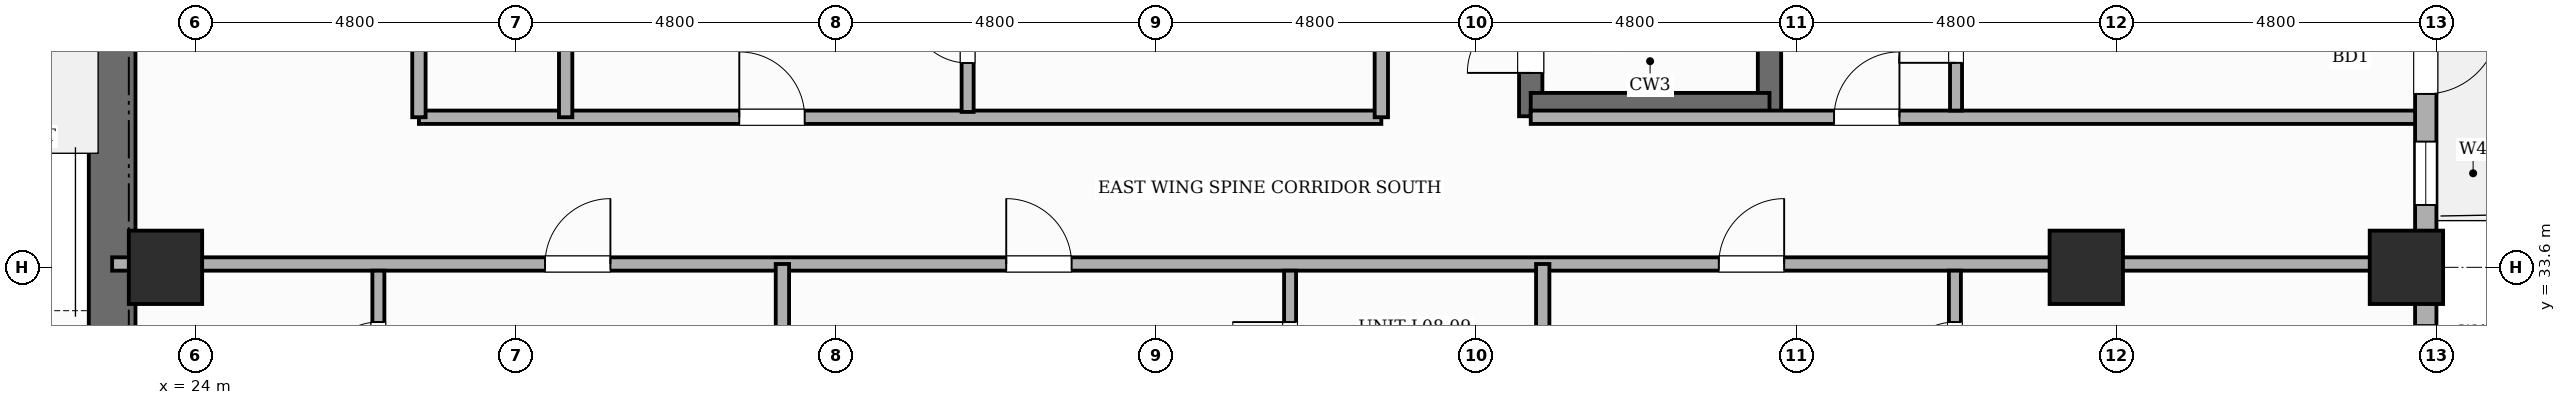
"""IFC4 building model, lengths in metres.
Left out: names, types, materials, properties, quantities, classifications, styles, units other than length and angle.
Written with IfcOpenShell. Run it as: python <this file> out.ifc"""

import sys

from ifc_helpers import new_model, si_unit, direction, frame, frame_2d, origin, origin_2d, place, context, subcontext, project, spatial, rectangle, extrude, element, fill, save


model = new_model("IFC4")
c1 = context("Model", 3, precision=1e-05, world=origin(), true_north=direction((0.0, 1.0)))
c2 = subcontext(c1, "Body", "Model", "MODEL_VIEW")
j1 = project(units=[si_unit("LENGTHUNIT", "METRE"), si_unit("PLANEANGLEUNIT", "RADIAN")], contexts=[c1])
p1 = place(None, origin())
s1 = spatial("IfcSite", under=j1, at=p1, CompositionType="ELEMENT")
p2 = place(p1, origin())
s2 = spatial("IfcBuilding", under=s1, at=p2, CompositionType="ELEMENT")
p3 = place(p2, frame((0.0, 0.0, 35.8)))
s3 = spatial("IfcBuildingStorey", under=s2, at=p3, CompositionType="ELEMENT", Elevation=35.8)
p4 = place(p3, frame((22.75, 30.55, 0.0), z_axis=(0.0, 0.0, 1.0), x_axis=(0.0, 1.0, 0.0)))
e1 = element("IfcWall", 1, at=p4, inside=s3, PredefinedType="SHEAR", context=c2, shape_type="SweptSolid", body=[
    extrude(rectangle(XDim=15.6, YDim=0.7, at=frame_2d((7.8, 0.0))), origin(), (0.0, 0.0, 1.0), 3.6),
])
p5 = place(p4, frame((10.8, 0.0, 0.0)))
e2 = element("IfcOpeningElement", 2, at=p5, cuts=e1, PredefinedType="OPENING", context=c2, shape_type="SweptSolid", body=[
    extrude(rectangle(XDim=1.0, YDim=2.15, at=frame_2d((0.5, 1.075))), frame((0.0, 0.36, 0.0), z_axis=(0.0, -1.0, 0.0), x_axis=(1.0, 0.0, 0.0)), (0.0, 0.0, 1.0), 0.72),
])
p6 = place(p3, frame((44.02, 35.865, 0.0), z_axis=(0.0, 0.0, 1.0), x_axis=(0.0, 1.0, 0.0)))
e3 = element("IfcWall", 3, at=p6, inside=s3, PredefinedType="SHEAR", context=c2, shape_type="SweptSolid", body=[
    extrude(rectangle(XDim=8.97, YDim=0.35, at=frame_2d((4.485, 0.0))), origin(), (0.0, 0.0, 1.0), 3.6),
])
p7 = place(p6, frame((0.65, 0.0, 0.0)))
e4 = element("IfcOpeningElement", 4, at=p7, cuts=e3, PredefinedType="OPENING", context=c2, shape_type="SweptSolid", body=[
    extrude(rectangle(XDim=0.95, YDim=2.1, at=frame_2d((0.475, 1.05))), frame((0.0, 0.185, 0.0), z_axis=(0.0, -1.0, 0.0), x_axis=(1.0, 0.0, 0.0)), (0.0, 0.0, 1.0), 0.37),
])
p8 = place(p3, frame((47.6, 35.865, 0.0), z_axis=(0.0, 0.0, 1.0), x_axis=(0.0, 1.0, 0.0)))
e5 = element("IfcWall", 5, at=p8, inside=s3, PredefinedType="SHEAR", context=c2, shape_type="SweptSolid", body=[
    extrude(rectangle(XDim=8.97, YDim=0.35, at=frame_2d((4.485, 0.0))), origin(), (0.0, 0.0, 1.0), 3.6),
])
p9 = place(p3, frame((44.02, 36.04, 0.0), z_axis=(0.0, 0.0, 1.0), x_axis=(1.0, 0.0, 0.0)))
e6 = element("IfcWall", 6, at=p9, inside=s3, PredefinedType="SHEAR", context=c2, shape_type="SweptSolid", body=[
    extrude(rectangle(XDim=3.58, YDim=0.35, at=frame_2d((1.79, 0.0))), origin(), (0.0, 0.0, 1.0), 3.6),
])
for number, where, z_axis, x_axis in (
    (7, (23.55, 33.6, 0.0), (0.0, 0.0, 1.0), (1.0, 0.0, 0.0)),
    (8, (52.35, 33.6, 0.0), (0.0, 0.0, 1.0), (1.0, 0.0, 0.0)),
    (9, (57.15, 33.6, 0.0), (0.0, 0.0, 1.0), (1.0, 0.0, 0.0)),
):
    element("IfcColumn", number, at=place(p3, frame(where, z_axis=z_axis, x_axis=x_axis)), inside=s3, PredefinedType="COLUMN", context=c2, shape_type="SweptSolid", body=[
        extrude(rectangle(XDim=1.1, YDim=1.1, at=origin_2d()), origin(), (0.0, 0.0, 1.0), 3.6),
    ])
p10 = place(p3, frame((57.44, 45.6, 0.0), z_axis=(0.0, 0.0, 1.0), x_axis=(0.0, -1.0, 0.0)))
e10 = element("IfcWall", 10, at=p10, inside=s3, PredefinedType="STANDARD", context=c2, shape_type="SweptSolid", body=[
    extrude(rectangle(XDim=14.4, YDim=0.32, at=frame_2d((7.2, 0.0))), origin(), (0.0, 0.0, 1.0), 2.53),
])
p11 = place(p10, frame((8.3, 0.0, 0.0)))
e11 = element("IfcOpeningElement", 11, at=p11, cuts=e10, PredefinedType="OPENING", context=c2, shape_type="SweptSolid", body=[
    extrude(rectangle(XDim=1.1, YDim=2.15, at=frame_2d((0.55, 1.075))), frame((0.0, 0.17, 0.0), z_axis=(0.0, -1.0, 0.0), x_axis=(1.0, 0.0, 0.0)), (0.0, 0.0, 1.0), 0.34),
])
p12 = place(p10, frame((0.47, 0.0, 0.45)))
e12 = element("IfcOpeningElement", 12, at=p12, cuts=e10, PredefinedType="OPENING", context=c2, shape_type="SweptSolid", body=[
    extrude(rectangle(XDim=0.95, YDim=1.8, at=frame_2d((0.475, 0.9))), frame((0.0, 0.17, 0.0), z_axis=(0.0, -1.0, 0.0), x_axis=(1.0, 0.0, 0.0)), (0.0, 0.0, 1.0), 0.34),
])
p13 = place(p10, frame((10.115, 0.0, 0.45)))
e13 = element("IfcOpeningElement", 13, at=p13, cuts=e10, PredefinedType="OPENING", context=c2, shape_type="SweptSolid", body=[
    extrude(rectangle(XDim=0.95, YDim=1.8, at=frame_2d((0.475, 0.9))), frame((0.0, 0.17, 0.0), z_axis=(0.0, -1.0, 0.0), x_axis=(1.0, 0.0, 0.0)), (0.0, 0.0, 1.0), 0.34),
])
p14 = place(p10, frame((12.867, 0.0, 0.45)))
e14 = element("IfcOpeningElement", 14, at=p14, cuts=e10, PredefinedType="OPENING", context=c2, shape_type="SweptSolid", body=[
    extrude(rectangle(XDim=0.95, YDim=1.8, at=frame_2d((0.475, 0.9))), frame((0.0, 0.17, 0.0), z_axis=(0.0, -1.0, 0.0), x_axis=(1.0, 0.0, 0.0)), (0.0, 0.0, 1.0), 0.34),
])
p15 = place(p10, frame((4.799, 0.0, 0.65)))
e15 = element("IfcOpeningElement", 15, at=p15, cuts=e10, PredefinedType="OPENING", context=c2, shape_type="SweptSolid", body=[
    extrude(rectangle(XDim=1.4, YDim=1.1, at=frame_2d((0.7, 0.55))), frame((0.0, 0.17, 0.0), z_axis=(0.0, -1.0, 0.0), x_axis=(1.0, 0.0, 0.0)), (0.0, 0.0, 1.0), 0.34),
])
p16 = place(p10, frame((3.194, 0.0, 0.45)))
e16 = element("IfcOpeningElement", 16, at=p16, cuts=e10, PredefinedType="OPENING", context=c2, shape_type="SweptSolid", body=[
    extrude(rectangle(XDim=0.95, YDim=1.8, at=frame_2d((0.475, 0.9))), frame((0.0, 0.17, 0.0), z_axis=(0.0, -1.0, 0.0), x_axis=(1.0, 0.0, 0.0)), (0.0, 0.0, 1.0), 0.34),
])
p17 = place(p3, frame((22.75, 33.65, 0.0), z_axis=(0.0, 0.0, 1.0), x_axis=(1.0, 0.0, 0.0)))
e17 = element("IfcWall", 17, at=p17, inside=s3, PredefinedType="PARTITIONING", context=c2, shape_type="SweptSolid", body=[
    extrude(rectangle(XDim=34.53, YDim=0.2, at=frame_2d((17.265, 0.0))), origin(), (0.0, 0.0, 1.0), 2.53),
])
p18 = place(p17, frame((6.491, 0.0, 0.0)))
e18 = element("IfcOpeningElement", 18, at=p18, cuts=e17, PredefinedType="OPENING", context=c2, shape_type="SweptSolid", body=[
    extrude(rectangle(XDim=0.98, YDim=2.18, at=frame_2d((0.49, 1.09))), frame((0.0, 0.11, 0.0), z_axis=(0.0, -1.0, 0.0), x_axis=(1.0, 0.0, 0.0)), (0.0, 0.0, 1.0), 0.22),
])
p19 = place(p17, frame((13.406, 0.0, 0.0)))
e19 = element("IfcOpeningElement", 19, at=p19, cuts=e17, PredefinedType="OPENING", context=c2, shape_type="SweptSolid", body=[
    extrude(rectangle(XDim=0.98, YDim=2.18, at=frame_2d((0.49, 1.09))), frame((0.0, 0.11, 0.0), z_axis=(0.0, -1.0, 0.0), x_axis=(1.0, 0.0, 0.0)), (0.0, 0.0, 1.0), 0.22),
])
p20 = place(p17, frame((24.09, 0.0, 0.0)))
e20 = element("IfcOpeningElement", 20, at=p20, cuts=e17, PredefinedType="OPENING", context=c2, shape_type="SweptSolid", body=[
    extrude(rectangle(XDim=0.98, YDim=2.18, at=frame_2d((0.49, 1.09))), frame((0.0, 0.11, 0.0), z_axis=(0.0, -1.0, 0.0), x_axis=(1.0, 0.0, 0.0)), (0.0, 0.0, 1.0), 0.22),
])
p21 = place(p3, frame((27.35, 35.85, 0.0), z_axis=(0.0, 0.0, 1.0), x_axis=(1.0, 0.0, 0.0)))
e21 = element("IfcWall", 21, at=p21, inside=s3, PredefinedType="PARTITIONING", context=c2, shape_type="SweptSolid", body=[
    extrude(rectangle(XDim=14.43, YDim=0.2, at=frame_2d((7.215, 0.0))), origin(), (0.0, 0.0, 1.0), 3.35),
])
p22 = place(p21, frame((4.803, 0.0, 0.0)))
e22 = element("IfcOpeningElement", 22, at=p22, cuts=e21, PredefinedType="OPENING", context=c2, shape_type="SweptSolid", body=[
    extrude(rectangle(XDim=0.98, YDim=2.18, at=frame_2d((0.49, 1.09))), frame((0.0, 0.11, 0.0), z_axis=(0.0, -1.0, 0.0), x_axis=(1.0, 0.0, 0.0)), (0.0, 0.0, 1.0), 0.22),
])
p23 = place(p3, frame((44.02, 35.85, 0.0), z_axis=(0.0, 0.0, 1.0), x_axis=(1.0, 0.0, 0.0)))
e23 = element("IfcWall", 23, at=p23, inside=s3, PredefinedType="PARTITIONING", context=c2, shape_type="SweptSolid", body=[
    extrude(rectangle(XDim=13.26, YDim=0.2, at=frame_2d((6.63, 0.0))), origin(), (0.0, 0.0, 1.0), 3.35),
])
p24 = place(p23, frame((4.549, 0.0, 0.0)))
e24 = element("IfcOpeningElement", 24, at=p24, cuts=e23, PredefinedType="OPENING", context=c2, shape_type="SweptSolid", body=[
    extrude(rectangle(XDim=0.98, YDim=2.18, at=frame_2d((0.49, 1.09))), frame((0.0, 0.11, 0.0), z_axis=(0.0, -1.0, 0.0), x_axis=(1.0, 0.0, 0.0)), (0.0, 0.0, 1.0), 0.22),
])
p25 = place(p3, frame((27.35, 35.85, 0.0), z_axis=(0.0, 0.0, 1.0), x_axis=(0.0, 1.0, 0.0)))
e25 = element("IfcWall", 25, at=p25, inside=s3, PredefinedType="PARTITIONING", context=c2, shape_type="SweptSolid", body=[
    extrude(rectangle(XDim=11.83, YDim=0.2, at=frame_2d((5.915, 0.0))), origin(), (0.0, 0.0, 1.0), 3.35),
])
p26 = place(p25, frame((1.2, 0.0, 0.0)))
e26 = element("IfcOpeningElement", 26, at=p26, cuts=e25, PredefinedType="OPENING", context=c2, shape_type="SweptSolid", body=[
    extrude(rectangle(XDim=0.95, YDim=2.15, at=frame_2d((0.475, 1.075))), frame((0.0, 0.11, 0.0), z_axis=(0.0, -1.0, 0.0), x_axis=(1.0, 0.0, 0.0)), (0.0, 0.0, 1.0), 0.22),
])
p27 = place(p3, frame((41.78, 35.85, 0.0), z_axis=(0.0, 0.0, 1.0), x_axis=(0.0, 1.0, 0.0)))
e27 = element("IfcWall", 27, at=p27, inside=s3, PredefinedType="PARTITIONING", context=c2, shape_type="SweptSolid", body=[
    extrude(rectangle(XDim=2.45, YDim=0.2, at=frame_2d((1.225, 0.0))), origin(), (0.0, 0.0, 1.0), 3.35),
])
p28 = place(p3, frame((26.742, 29.12, 0.0), z_axis=(0.0, 0.0, 1.0), x_axis=(0.0, 1.0, 0.0)))
e28 = element("IfcWall", 28, at=p28, inside=s3, PredefinedType="PLUMBINGWALL", context=c2, shape_type="SweptSolid", body=[
    extrude(rectangle(XDim=4.43, YDim=0.18, at=frame_2d((2.215, 0.0))), origin(), (0.0, 0.0, 1.0), 3.35),
])
p29 = place(p28, frame((0.459, 0.0, 0.0)))
e29 = element("IfcOpeningElement", 29, at=p29, cuts=e28, PredefinedType="OPENING", context=c2, shape_type="SweptSolid", body=[
    extrude(rectangle(XDim=0.86, YDim=2.1, at=frame_2d((0.43, 1.05))), frame((0.0, 0.1, 0.0), z_axis=(0.0, -1.0, 0.0), x_axis=(1.0, 0.0, 0.0)), (0.0, 0.0, 1.0), 0.2),
])
p30 = place(p28, frame((2.799, 0.0, 0.0)))
e30 = element("IfcOpeningElement", 30, at=p30, cuts=e28, PredefinedType="OPENING", context=c2, shape_type="SweptSolid", body=[
    extrude(rectangle(XDim=0.86, YDim=2.1, at=frame_2d((0.43, 1.05))), frame((0.0, 0.1, 0.0), z_axis=(0.0, -1.0, 0.0), x_axis=(1.0, 0.0, 0.0)), (0.0, 0.0, 1.0), 0.2),
])
p31 = place(p3, frame((32.8, 29.12, 0.0), z_axis=(0.0, 0.0, 1.0), x_axis=(0.0, 1.0, 0.0)))
e31 = element("IfcWall", 31, at=p31, inside=s3, PredefinedType="SOLIDWALL", context=c2, shape_type="SweptSolid", body=[
    extrude(rectangle(XDim=4.53, YDim=0.2, at=frame_2d((2.265, 0.0))), origin(), (0.0, 0.0, 1.0), 3.35),
])
p32 = place(p3, frame((40.412, 29.12, 0.0), z_axis=(0.0, 0.0, 1.0), x_axis=(0.0, 1.0, 0.0)))
e32 = element("IfcWall", 32, at=p32, inside=s3, PredefinedType="PLUMBINGWALL", context=c2, shape_type="SweptSolid", body=[
    extrude(rectangle(XDim=4.43, YDim=0.18, at=frame_2d((2.215, 0.0))), origin(), (0.0, 0.0, 1.0), 3.35),
])
p33 = place(p32, frame((0.459, 0.0, 0.0)))
e33 = element("IfcOpeningElement", 33, at=p33, cuts=e32, PredefinedType="OPENING", context=c2, shape_type="SweptSolid", body=[
    extrude(rectangle(XDim=0.86, YDim=2.1, at=frame_2d((0.43, 1.05))), frame((0.0, 0.1, 0.0), z_axis=(0.0, -1.0, 0.0), x_axis=(1.0, 0.0, 0.0)), (0.0, 0.0, 1.0), 0.2),
])
p34 = place(p32, frame((2.799, 0.0, 0.0)))
e34 = element("IfcOpeningElement", 34, at=p34, cuts=e32, PredefinedType="OPENING", context=c2, shape_type="SweptSolid", body=[
    extrude(rectangle(XDim=0.86, YDim=2.1, at=frame_2d((0.43, 1.05))), frame((0.0, 0.1, 0.0), z_axis=(0.0, -1.0, 0.0), x_axis=(1.0, 0.0, 0.0)), (0.0, 0.0, 1.0), 0.2),
])
p35 = place(p3, frame((44.2, 29.12, 0.0), z_axis=(0.0, 0.0, 1.0), x_axis=(0.0, 1.0, 0.0)))
e35 = element("IfcWall", 35, at=p35, inside=s3, PredefinedType="SOLIDWALL", context=c2, shape_type="SweptSolid", body=[
    extrude(rectangle(XDim=4.53, YDim=0.2, at=frame_2d((2.265, 0.0))), origin(), (0.0, 0.0, 1.0), 3.35),
])
p36 = place(p3, frame((50.38, 29.12, 0.0), z_axis=(0.0, 0.0, 1.0), x_axis=(0.0, 1.0, 0.0)))
e36 = element("IfcWall", 36, at=p36, inside=s3, PredefinedType="PLUMBINGWALL", context=c2, shape_type="SweptSolid", body=[
    extrude(rectangle(XDim=4.43, YDim=0.18, at=frame_2d((2.215, 0.0))), origin(), (0.0, 0.0, 1.0), 3.35),
])
p37 = place(p36, frame((0.459, 0.0, 0.0)))
e37 = element("IfcOpeningElement", 37, at=p37, cuts=e36, PredefinedType="OPENING", context=c2, shape_type="SweptSolid", body=[
    extrude(rectangle(XDim=0.86, YDim=2.1, at=frame_2d((0.43, 1.05))), frame((0.0, 0.1, 0.0), z_axis=(0.0, -1.0, 0.0), x_axis=(1.0, 0.0, 0.0)), (0.0, 0.0, 1.0), 0.2),
])
p38 = place(p36, frame((2.799, 0.0, 0.0)))
e38 = element("IfcOpeningElement", 38, at=p38, cuts=e36, PredefinedType="OPENING", context=c2, shape_type="SweptSolid", body=[
    extrude(rectangle(XDim=0.86, YDim=2.1, at=frame_2d((0.43, 1.05))), frame((0.0, 0.1, 0.0), z_axis=(0.0, -1.0, 0.0), x_axis=(1.0, 0.0, 0.0)), (0.0, 0.0, 1.0), 0.2),
])
p39 = place(p3, frame((29.55, 35.85, 0.0), z_axis=(0.0, 0.0, 1.0), x_axis=(0.0, 1.0, 0.0)))
e39 = element("IfcWall", 39, at=p39, inside=s3, PredefinedType="SOLIDWALL", context=c2, shape_type="SweptSolid", body=[
    extrude(rectangle(XDim=11.83, YDim=0.2, at=frame_2d((5.915, 0.0))), origin(), (0.0, 0.0, 1.0), 3.35),
])
p40 = place(p3, frame((35.577, 35.93, 0.0), z_axis=(0.0, 0.0, 1.0), x_axis=(0.0, 1.0, 0.0)))
e40 = element("IfcWall", 40, at=p40, inside=s3, PredefinedType="PLUMBINGWALL", context=c2, shape_type="SweptSolid", body=[
    extrude(rectangle(XDim=11.75, YDim=0.18, at=frame_2d((5.875, 0.0))), origin(), (0.0, 0.0, 1.0), 3.35),
])
p41 = place(p40, frame((0.733, 0.0, 0.0)))
e41 = element("IfcOpeningElement", 41, at=p41, cuts=e40, PredefinedType="OPENING", context=c2, shape_type="SweptSolid", body=[
    extrude(rectangle(XDim=0.86, YDim=2.1, at=frame_2d((0.43, 1.05))), frame((0.0, 0.1, 0.0), z_axis=(0.0, -1.0, 0.0), x_axis=(1.0, 0.0, 0.0)), (0.0, 0.0, 1.0), 0.2),
])
p42 = place(p40, frame((4.064, 0.0, 0.0)))
e42 = element("IfcOpeningElement", 42, at=p42, cuts=e40, PredefinedType="OPENING", context=c2, shape_type="SweptSolid", body=[
    extrude(rectangle(XDim=0.9, YDim=2.15, at=frame_2d((0.45, 1.075))), frame((0.0, 0.1, 0.0), z_axis=(0.0, -1.0, 0.0), x_axis=(1.0, 0.0, 0.0)), (0.0, 0.0, 1.0), 0.2),
])
p43 = place(p40, frame((8.789, 0.0, 0.0)))
e43 = element("IfcOpeningElement", 43, at=p43, cuts=e40, PredefinedType="OPENING", context=c2, shape_type="SweptSolid", body=[
    extrude(rectangle(XDim=0.9, YDim=2.15, at=frame_2d((0.45, 1.075))), frame((0.0, 0.1, 0.0), z_axis=(0.0, -1.0, 0.0), x_axis=(1.0, 0.0, 0.0)), (0.0, 0.0, 1.0), 0.2),
])
p44 = place(p3, frame((50.397, 35.95, 0.0), z_axis=(0.0, 0.0, 1.0), x_axis=(0.0, 1.0, 0.0)))
e44 = element("IfcWall", 44, at=p44, inside=s3, PredefinedType="PLUMBINGWALL", context=c2, shape_type="SweptSolid", body=[
    extrude(rectangle(XDim=11.73, YDim=0.18, at=frame_2d((5.865, 0.0))), origin(), (0.0, 0.0, 1.0), 3.35),
])
p45 = place(p44, frame((0.716, 0.0, 0.0)))
e45 = element("IfcOpeningElement", 45, at=p45, cuts=e44, PredefinedType="OPENING", context=c2, shape_type="SweptSolid", body=[
    extrude(rectangle(XDim=0.86, YDim=2.1, at=frame_2d((0.43, 1.05))), frame((0.0, 0.1, 0.0), z_axis=(0.0, -1.0, 0.0), x_axis=(1.0, 0.0, 0.0)), (0.0, 0.0, 1.0), 0.2),
])
p46 = place(p44, frame((3.335, 0.0, 0.0)))
e46 = element("IfcOpeningElement", 46, at=p46, cuts=e44, PredefinedType="OPENING", context=c2, shape_type="SweptSolid", body=[
    extrude(rectangle(XDim=0.86, YDim=2.1, at=frame_2d((0.43, 1.05))), frame((0.0, 0.1, 0.0), z_axis=(0.0, -1.0, 0.0), x_axis=(1.0, 0.0, 0.0)), (0.0, 0.0, 1.0), 0.2),
])
p47 = place(p44, frame((5.907, 0.0, 0.0)))
e47 = element("IfcOpeningElement", 47, at=p47, cuts=e44, PredefinedType="OPENING", context=c2, shape_type="SweptSolid", body=[
    extrude(rectangle(XDim=0.86, YDim=2.1, at=frame_2d((0.43, 1.05))), frame((0.0, 0.1, 0.0), z_axis=(0.0, -1.0, 0.0), x_axis=(1.0, 0.0, 0.0)), (0.0, 0.0, 1.0), 0.2),
])
p48 = place(p44, frame((9.128, 0.0, 0.0)))
e48 = element("IfcOpeningElement", 48, at=p48, cuts=e44, PredefinedType="OPENING", context=c2, shape_type="SweptSolid", body=[
    extrude(rectangle(XDim=0.9, YDim=2.15, at=frame_2d((0.45, 1.075))), frame((0.0, 0.1, 0.0), z_axis=(0.0, -1.0, 0.0), x_axis=(1.0, 0.0, 0.0)), (0.0, 0.0, 1.0), 0.2),
])
p49 = place(p11, origin())
e49 = element("IfcDoor", 49, at=p49, inside=s3, OperationType="SINGLE_SWING_LEFT", PredefinedType="DOOR", context=c2, shape_type="SweptSolid", body=[
    extrude(rectangle(XDim=1.1, YDim=2.15, at=frame_2d((0.55, 1.075))), frame((0.0, 0.025, 0.0), z_axis=(0.0, -1.0, 0.0), x_axis=(1.0, 0.0, 0.0)), (0.0, 0.0, 1.0), 0.05),
])
fill(e11, e49)
p50 = place(p13, origin())
e50 = element("IfcWindow", 50, at=p50, inside=s3, PartitioningType="SINGLE_PANEL", PredefinedType="WINDOW", context=c2, shape_type="SweptSolid", body=[
    extrude(rectangle(XDim=0.95, YDim=1.8, at=frame_2d((0.475, 0.9))), frame((0.0, 0.03, 0.0), z_axis=(0.0, -1.0, 0.0), x_axis=(1.0, 0.0, 0.0)), (0.0, 0.0, 1.0), 0.06),
])
fill(e13, e50)
p51 = place(p7, origin())
e51 = element("IfcDoor", 51, at=p51, inside=s3, OperationType="SINGLE_SWING_LEFT", PredefinedType="DOOR", context=c2, shape_type="SweptSolid", body=[
    extrude(rectangle(XDim=0.95, YDim=2.1, at=frame_2d((0.475, 1.05))), frame((0.0, 0.025, 0.0), z_axis=(0.0, -1.0, 0.0), x_axis=(1.0, 0.0, 0.0)), (0.0, 0.0, 1.0), 0.05),
])
fill(e4, e51)
p52 = place(p18, origin())
e52 = element("IfcDoor", 52, at=p52, inside=s3, OperationType="SINGLE_SWING_RIGHT", PredefinedType="DOOR", context=c2, shape_type="SweptSolid", body=[
    extrude(rectangle(XDim=0.98, YDim=2.18, at=frame_2d((0.49, 1.09))), frame((0.0, 0.025, 0.0), z_axis=(0.0, -1.0, 0.0), x_axis=(1.0, 0.0, 0.0)), (0.0, 0.0, 1.0), 0.05),
])
fill(e18, e52)
p53 = place(p30, origin())
e53 = element("IfcDoor", 53, at=p53, inside=s3, OperationType="SINGLE_SWING_LEFT", PredefinedType="DOOR", context=c2, shape_type="SweptSolid", body=[
    extrude(rectangle(XDim=0.86, YDim=2.1, at=frame_2d((0.43, 1.05))), frame((0.0, 0.025, 0.0), z_axis=(0.0, -1.0, 0.0), x_axis=(1.0, 0.0, 0.0)), (0.0, 0.0, 1.0), 0.05),
])
fill(e30, e53)
p54 = place(p19, origin())
e54 = element("IfcDoor", 54, at=p54, inside=s3, OperationType="SINGLE_SWING_LEFT", PredefinedType="DOOR", context=c2, shape_type="SweptSolid", body=[
    extrude(rectangle(XDim=0.98, YDim=2.18, at=frame_2d((0.49, 1.09))), frame((0.0, 0.025, 0.0), z_axis=(0.0, -1.0, 0.0), x_axis=(1.0, 0.0, 0.0)), (0.0, 0.0, 1.0), 0.05),
])
fill(e19, e54)
p55 = place(p34, origin())
e55 = element("IfcDoor", 55, at=p55, inside=s3, OperationType="SINGLE_SWING_RIGHT", PredefinedType="DOOR", context=c2, shape_type="SweptSolid", body=[
    extrude(rectangle(XDim=0.86, YDim=2.1, at=frame_2d((0.43, 1.05))), frame((0.0, 0.025, 0.0), z_axis=(0.0, -1.0, 0.0), x_axis=(1.0, 0.0, 0.0)), (0.0, 0.0, 1.0), 0.05),
])
fill(e34, e55)
p56 = place(p20, origin())
e56 = element("IfcDoor", 56, at=p56, inside=s3, OperationType="SINGLE_SWING_RIGHT", PredefinedType="DOOR", context=c2, shape_type="SweptSolid", body=[
    extrude(rectangle(XDim=0.98, YDim=2.18, at=frame_2d((0.49, 1.09))), frame((0.0, 0.025, 0.0), z_axis=(0.0, -1.0, 0.0), x_axis=(1.0, 0.0, 0.0)), (0.0, 0.0, 1.0), 0.05),
])
fill(e20, e56)
p57 = place(p38, origin())
e57 = element("IfcDoor", 57, at=p57, inside=s3, OperationType="SINGLE_SWING_LEFT", PredefinedType="DOOR", context=c2, shape_type="SweptSolid", body=[
    extrude(rectangle(XDim=0.86, YDim=2.1, at=frame_2d((0.43, 1.05))), frame((0.0, 0.025, 0.0), z_axis=(0.0, -1.0, 0.0), x_axis=(1.0, 0.0, 0.0)), (0.0, 0.0, 1.0), 0.05),
])
fill(e38, e57)
p58 = place(p22, origin())
e58 = element("IfcDoor", 58, at=p58, inside=s3, OperationType="SINGLE_SWING_LEFT", PredefinedType="DOOR", context=c2, shape_type="SweptSolid", body=[
    extrude(rectangle(XDim=0.98, YDim=2.18, at=frame_2d((0.49, 1.09))), frame((0.0, 0.025, 0.0), z_axis=(0.0, -1.0, 0.0), x_axis=(1.0, 0.0, 0.0)), (0.0, 0.0, 1.0), 0.05),
])
fill(e22, e58)
p59 = place(p41, origin())
e59 = element("IfcDoor", 59, at=p59, inside=s3, OperationType="SINGLE_SWING_RIGHT", PredefinedType="DOOR", context=c2, shape_type="SweptSolid", body=[
    extrude(rectangle(XDim=0.86, YDim=2.1, at=frame_2d((0.43, 1.05))), frame((0.0, 0.025, 0.0), z_axis=(0.0, -1.0, 0.0), x_axis=(1.0, 0.0, 0.0)), (0.0, 0.0, 1.0), 0.05),
])
fill(e41, e59)
p60 = place(p24, origin())
e60 = element("IfcDoor", 60, at=p60, inside=s3, OperationType="SINGLE_SWING_RIGHT", PredefinedType="DOOR", context=c2, shape_type="SweptSolid", body=[
    extrude(rectangle(XDim=0.98, YDim=2.18, at=frame_2d((0.49, 1.09))), frame((0.0, 0.025, 0.0), z_axis=(0.0, -1.0, 0.0), x_axis=(1.0, 0.0, 0.0)), (0.0, 0.0, 1.0), 0.05),
])
fill(e24, e60)
p61 = place(p45, origin())
e61 = element("IfcDoor", 61, at=p61, inside=s3, OperationType="SINGLE_SWING_LEFT", PredefinedType="DOOR", context=c2, shape_type="SweptSolid", body=[
    extrude(rectangle(XDim=0.86, YDim=2.1, at=frame_2d((0.43, 1.05))), frame((0.0, 0.025, 0.0), z_axis=(0.0, -1.0, 0.0), x_axis=(1.0, 0.0, 0.0)), (0.0, 0.0, 1.0), 0.05),
])
fill(e45, e61)
save(model, sys.argv[1])
